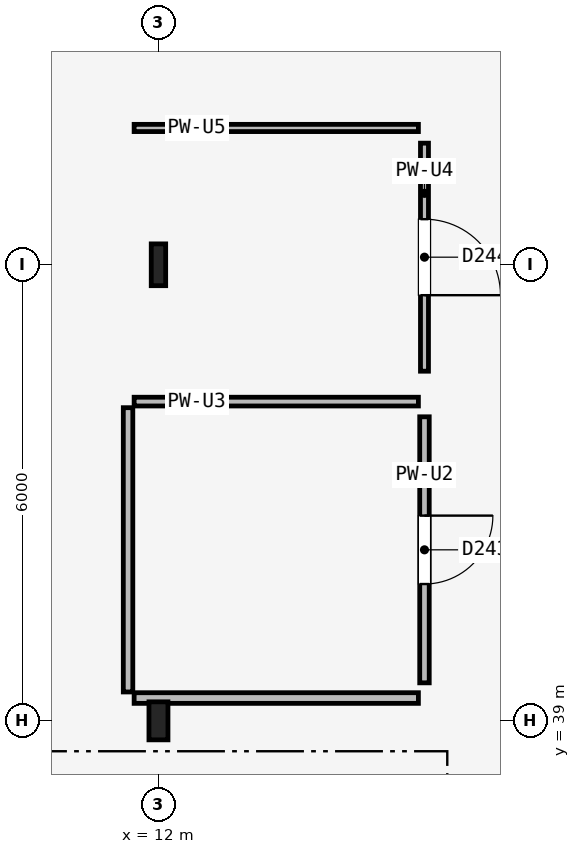
"""IFC4 building model, lengths in metres.
Left out: names, types, materials, properties, quantities, classifications, styles, units other than length and angle.
Written with IfcOpenShell. Run it as: python <this file> out.ifc"""

import sys

from ifc_helpers import new_model, si_unit, direction, frame, frame_2d, origin, origin_2d, place, context, subcontext, project, spatial, rectangle, i_section, extrude, element, fill, save


model = new_model("IFC4")
c1 = context("Model", 3, precision=1e-05, world=origin(), true_north=direction((0.0, 1.0)))
c2 = subcontext(c1, "Body", "Model", "MODEL_VIEW")
j1 = project(units=[si_unit("LENGTHUNIT", "METRE"), si_unit("PLANEANGLEUNIT", "RADIAN")], contexts=[c1])
p1 = place(None, origin())
s1 = spatial("IfcSite", under=j1, at=p1, CompositionType="ELEMENT")
p2 = place(p1, origin())
s2 = spatial("IfcBuilding", under=s1, at=p2, CompositionType="ELEMENT")
p3 = place(p2, frame((0.0, 0.0, 13.5)))
s3 = spatial("IfcBuildingStorey", under=s2, at=p3, CompositionType="ELEMENT", Elevation=13.5)
p4 = place(p3, frame((12.0, 39.0, 0.0), z_axis=(0.0, 0.0, 1.0), x_axis=(1.0, 0.0, 0.0)))
e1 = element("IfcColumn", 1, at=p4, inside=s3, PredefinedType="COLUMN", context=c2, shape_type="SweptSolid", body=[
    extrude(i_section(OverallWidth=0.25, OverallDepth=0.5, WebThickness=0.01, FlangeThickness=0.015, FilletRadius=0.015, at=origin_2d()), origin(), (0.0, 0.0, 1.0), 4.5),
])
p5 = place(p3, frame((12.0, 45.0, 0.0), z_axis=(0.0, 0.0, 1.0), x_axis=(1.0, 0.0, 0.0)))
e2 = element("IfcColumn", 2, at=p5, inside=s3, PredefinedType="COLUMN", context=c2, shape_type="SweptSolid", body=[
    extrude(i_section(OverallWidth=0.19, OverallDepth=0.55, WebThickness=0.011, FlangeThickness=0.019, FilletRadius=0.018, at=origin_2d()), origin(), (0.0, 0.0, 1.0), 4.5),
])
p6 = place(p3, frame((15.5, 43.0, 0.0), z_axis=(0.0, 0.0, 1.0), x_axis=(0.0, -1.0, 0.0)))
e3 = element("IfcWall", 3, at=p6, inside=s3, PredefinedType="PARTITIONING", context=c2, shape_type="SweptSolid", body=[
    extrude(rectangle(XDim=3.5, YDim=0.125, at=frame_2d((1.75, 0.0))), origin(), (0.0, 0.0, 1.0), 4.19),
])
p7 = place(p6, frame((1.3, 0.0, 0.0)))
e4 = element("IfcOpeningElement", 4, at=p7, cuts=e3, PredefinedType="OPENING", context=c2, shape_type="SweptSolid", body=[
    extrude(rectangle(XDim=0.9, YDim=2.1, at=frame_2d((0.45, 1.05))), frame((0.0, 0.073, 0.0), z_axis=(0.0, -1.0, 0.0), x_axis=(1.0, 0.0, 0.0)), (0.0, 0.0, 1.0), 0.145),
])
p8 = place(p3, frame((15.5, 46.6, 0.0), z_axis=(0.0, 0.0, 1.0), x_axis=(0.0, -1.0, 0.0)))
e5 = element("IfcWall", 5, at=p8, inside=s3, PredefinedType="PARTITIONING", context=c2, shape_type="SweptSolid", body=[
    extrude(rectangle(XDim=3.0, YDim=0.105, at=frame_2d((1.5, 0.0))), origin(), (0.0, 0.0, 1.0), 3.59),
])
p9 = place(p8, frame((1.0, 0.0, 0.0)))
e6 = element("IfcOpeningElement", 6, at=p9, cuts=e5, PredefinedType="OPENING", context=c2, shape_type="SweptSolid", body=[
    extrude(rectangle(XDim=1.0, YDim=2.1, at=frame_2d((0.5, 1.05))), frame((0.0, 0.062, 0.0), z_axis=(0.0, -1.0, 0.0), x_axis=(1.0, 0.0, 0.0)), (0.0, 0.0, 1.0), 0.125),
])
p10 = place(p3, frame((15.42, 39.3, 0.0), z_axis=(0.0, 0.0, 1.0), x_axis=(-1.0, 0.0, 0.0)))
e7 = element("IfcWall", 7, at=p10, inside=s3, PredefinedType="PARTITIONING", context=c2, shape_type="SweptSolid", body=[
    extrude(rectangle(XDim=3.74, YDim=0.14, at=frame_2d((1.87, 0.0))), origin(), (0.0, 0.0, 1.0), 3.69),
])
p11 = place(p3, frame((11.6, 39.38, 0.0), z_axis=(0.0, 0.0, 1.0), x_axis=(0.0, 1.0, 0.0)))
e8 = element("IfcWall", 8, at=p11, inside=s3, PredefinedType="PARTITIONING", context=c2, shape_type="SweptSolid", body=[
    extrude(rectangle(XDim=3.74, YDim=0.125, at=frame_2d((1.87, 0.0))), origin(), (0.0, 0.0, 1.0), 4.19),
])
p12 = place(p3, frame((11.68, 43.2, 0.0), z_axis=(0.0, 0.0, 1.0), x_axis=(1.0, 0.0, 0.0)))
e9 = element("IfcWall", 9, at=p12, inside=s3, PredefinedType="PARTITIONING", context=c2, shape_type="SweptSolid", body=[
    extrude(rectangle(XDim=3.74, YDim=0.115, at=frame_2d((1.87, 0.0))), origin(), (0.0, 0.0, 1.0), 3.69),
])
p13 = place(p3, frame((11.68, 46.8, 0.0), z_axis=(0.0, 0.0, 1.0), x_axis=(1.0, 0.0, 0.0)))
e10 = element("IfcWall", 10, at=p13, inside=s3, PredefinedType="PARTITIONING", context=c2, shape_type="SweptSolid", body=[
    extrude(rectangle(XDim=3.74, YDim=0.095, at=frame_2d((1.87, 0.0))), origin(), (0.0, 0.0, 1.0), 3.74),
])
p14 = place(p7, origin())
e11 = element("IfcDoor", 11, at=p14, inside=s3, OperationType="SINGLE_SWING_LEFT", PredefinedType="DOOR", context=c2, shape_type="SweptSolid", body=[
    extrude(rectangle(XDim=0.9, YDim=2.1, at=frame_2d((0.45, 1.05))), frame((0.0, 0.025, 0.0), z_axis=(0.0, -1.0, 0.0), x_axis=(1.0, 0.0, 0.0)), (0.0, 0.0, 1.0), 0.05),
])
fill(e4, e11)
p15 = place(p9, origin())
e12 = element("IfcDoor", 12, at=p15, inside=s3, OperationType="SINGLE_SWING_RIGHT", PredefinedType="DOOR", context=c2, shape_type="SweptSolid", body=[
    extrude(rectangle(XDim=1.0, YDim=2.1, at=frame_2d((0.5, 1.05))), frame((0.0, 0.025, 0.0), z_axis=(0.0, -1.0, 0.0), x_axis=(1.0, 0.0, 0.0)), (0.0, 0.0, 1.0), 0.05),
])
fill(e6, e12)
save(model, sys.argv[1])
